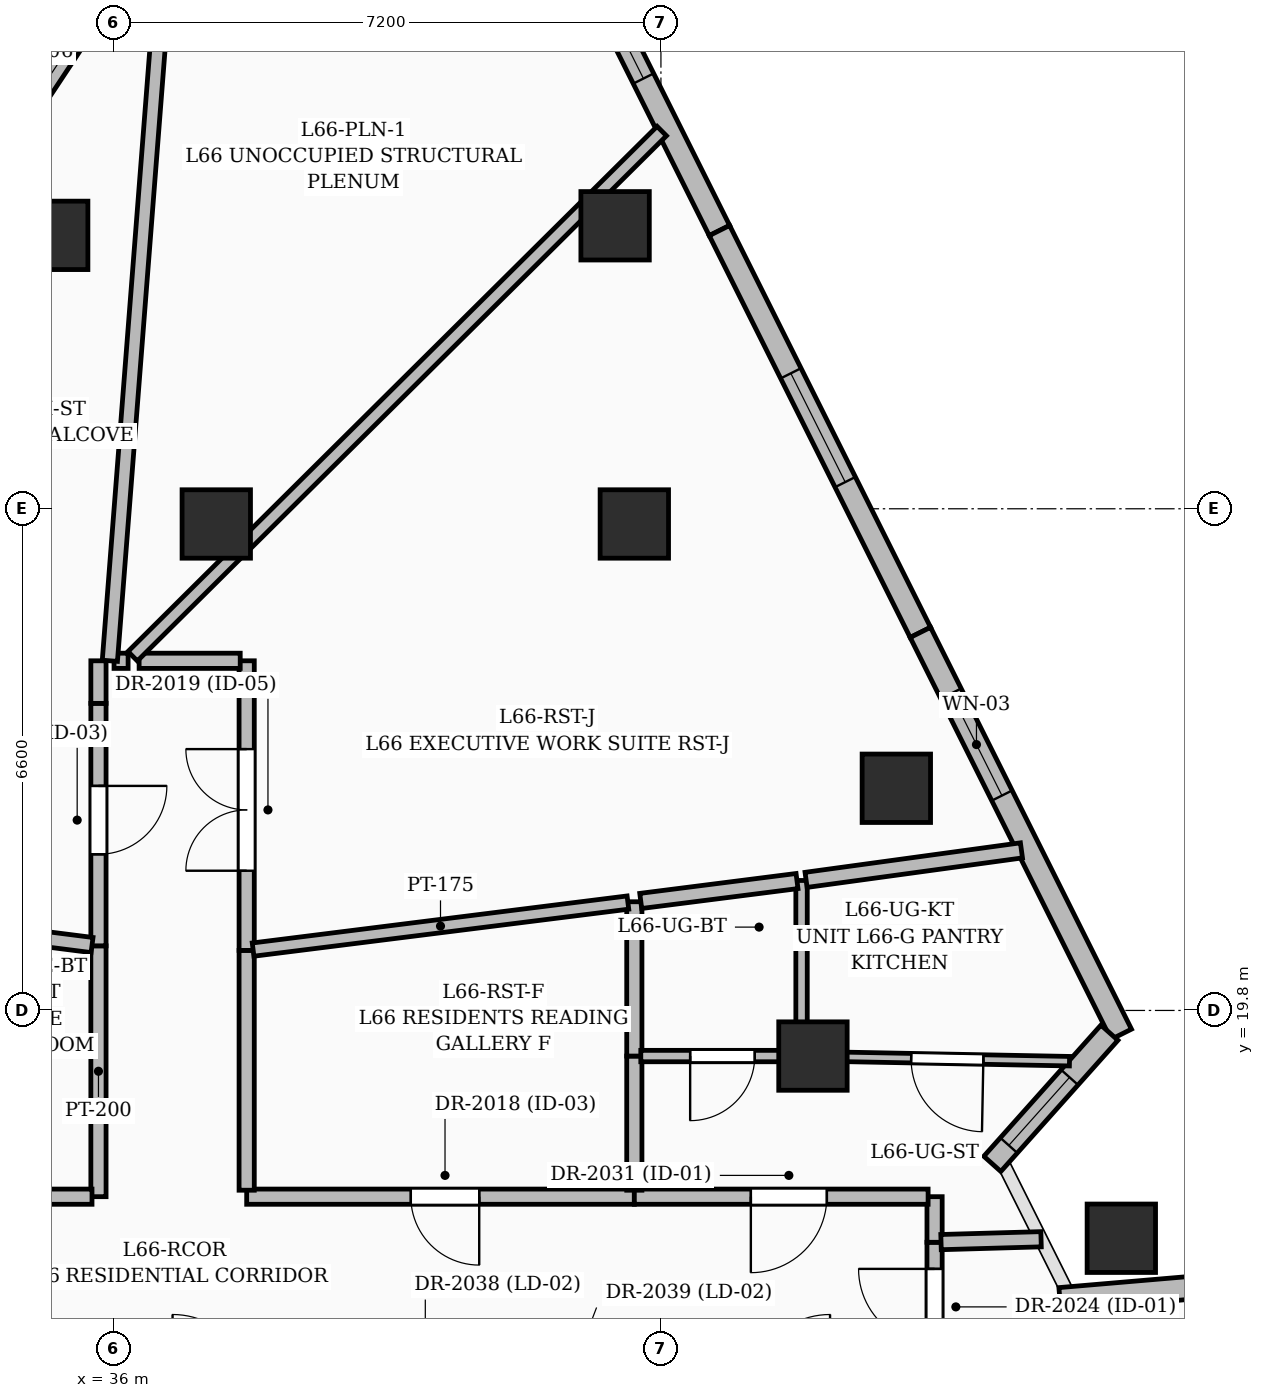
"""IFC4 building model, lengths in metres.
Left out: names, types, materials, properties, quantities, classifications, styles, units other than length and angle.
Written with IfcOpenShell. Run it as: python <this file> out.ifc"""

import sys

from ifc_helpers import new_model, si_unit, direction, frame, frame_2d, origin, origin_2d, place, context, subcontext, project, spatial, rectangle, extrude, element, fill, save


model = new_model("IFC4")
c1 = context("Model", 3, precision=1e-05, world=origin(), true_north=direction((0.0, 1.0)))
c2 = subcontext(c1, "Body", "Model", "MODEL_VIEW")
j1 = project(units=[si_unit("LENGTHUNIT", "METRE"), si_unit("PLANEANGLEUNIT", "RADIAN")], contexts=[c1])
p1 = place(None, origin())
s1 = spatial("IfcSite", under=j1, at=p1, CompositionType="ELEMENT")
p2 = place(p1, origin())
s2 = spatial("IfcBuilding", under=s1, at=p2, CompositionType="ELEMENT")
p3 = place(p2, frame((0.0, 0.0, 255.75)))
s3 = spatial("IfcBuildingStorey", under=s2, at=p3, CompositionType="ELEMENT", Elevation=255.75)
for number, where, z_axis, x_axis in (
    (1, (45.2, 19.2, 0.0), (0.0, 0.0, 1.0), (1.0, 0.0, 0.0)),
    (2, (42.85, 26.2, 0.0), (0.0, 0.0, 1.0), (1.0, 0.0, 0.0)),
    (3, (37.35, 26.2, 0.0), (0.0, 0.0, 1.0), (1.0, 0.0, 0.0)),
    (4, (49.257, 16.803, 0.0), (0.0, 0.0, 1.0), (1.0, 0.0, 0.0)),
    (5, (46.297, 22.723, 0.0), (0.0, 0.0, 1.0), (1.0, 0.0, 0.0)),
    (6, (42.597, 30.123, 0.0), (0.0, 0.0, 1.0), (1.0, 0.0, 0.0)),
    (7, (35.211, 29.997, 0.0), (0.0, 0.0, 1.0), (1.0, 0.0, 0.0)),
):
    element("IfcColumn", number, at=place(p3, frame(where, z_axis=z_axis, x_axis=x_axis)), inside=s3, PredefinedType="COLUMN", context=c2, shape_type="SweptSolid", body=[
        extrude(rectangle(XDim=0.9, YDim=0.9, at=origin_2d()), origin(), (0.0, 0.0, 1.0), 3.75),
    ])
p4 = place(p3, frame((33.699, 29.888, 0.0), z_axis=(0.0, 0.0, 1.0), x_axis=(0.552111744248, 0.833770125312, 0.0)))
e8 = element("IfcWall", 8, at=p4, inside=s3, PredefinedType="SOLIDWALL", context=c2, shape_type="SweptSolid", body=[
    extrude(rectangle(XDim=6.689, YDim=0.3, at=frame_2d((3.344, 0.0))), origin(), (0.0, 0.0, 1.0), 3.5),
])
p5 = place(p4, frame((1.6, 0.0, 0.55)))
e9 = element("IfcOpeningElement", 9, at=p5, cuts=e8, PredefinedType="OPENING", context=c2, shape_type="SweptSolid", body=[
    extrude(rectangle(XDim=1.6, YDim=2.2, at=frame_2d((0.8, 1.1))), frame((0.0, 0.16, 0.0), z_axis=(0.0, -1.0, 0.0), x_axis=(1.0, 0.0, 0.0)), (0.0, 0.0, 1.0), 0.32),
])
p6 = place(p3, frame((41.588, 34.824, 0.0), z_axis=(0.0, 0.0, 1.0), x_axis=(0.4472135955, -0.894427191, 0.0)))
e10 = element("IfcWall", 10, at=p6, inside=s3, PredefinedType="SOLIDWALL", context=c2, shape_type="SweptSolid", body=[
    extrude(rectangle(XDim=5.326, YDim=0.3, at=frame_2d((2.663, 0.0))), origin(), (0.0, 0.0, 1.0), 3.5),
])
p7 = place(p6, frame((1.29, 0.0, 0.6)))
e11 = element("IfcOpeningElement", 11, at=p7, cuts=e10, PredefinedType="OPENING", context=c2, shape_type="SweptSolid", body=[
    extrude(rectangle(XDim=1.8, YDim=2.1, at=frame_2d((0.9, 1.05))), frame((0.0, 0.16, 0.0), z_axis=(0.0, -1.0, 0.0), x_axis=(1.0, 0.0, 0.0)), (0.0, 0.0, 1.0), 0.32),
])
p8 = place(p3, frame((43.97, 30.06, 0.0), z_axis=(0.0, 0.0, 1.0), x_axis=(0.447246638907, -0.894410668534, 0.0)))
e12 = element("IfcWall", 12, at=p8, inside=s3, PredefinedType="SOLIDWALL", context=c2, shape_type="SweptSolid", body=[
    extrude(rectangle(XDim=5.911, YDim=0.3, at=frame_2d((2.955, 0.0))), origin(), (0.0, 0.0, 1.0), 3.5),
])
p9 = place(p8, frame((2.1, 0.0, 0.55)))
e13 = element("IfcOpeningElement", 13, at=p9, cuts=e12, PredefinedType="OPENING", context=c2, shape_type="SweptSolid", body=[
    extrude(rectangle(XDim=1.6, YDim=2.2, at=frame_2d((0.8, 1.1))), frame((0.0, 0.16, 0.0), z_axis=(0.0, -1.0, 0.0), x_axis=(1.0, 0.0, 0.0)), (0.0, 0.0, 1.0), 0.32),
])
p10 = place(p3, frame((46.613, 24.774, 0.0), z_axis=(0.0, 0.0, 1.0), x_axis=(0.447197073873, -0.894435451623, 0.0)))
e14 = element("IfcWall", 14, at=p10, inside=s3, PredefinedType="SOLIDWALL", context=c2, shape_type="SweptSolid", body=[
    extrude(rectangle(XDim=5.911, YDim=0.3, at=frame_2d((2.956, 0.0))), origin(), (0.0, 0.0, 1.0), 3.5),
])
p11 = place(p10, frame((0.9, 0.0, 0.6)))
e15 = element("IfcOpeningElement", 15, at=p11, cuts=e14, PredefinedType="OPENING", context=c2, shape_type="SweptSolid", body=[
    extrude(rectangle(XDim=1.5, YDim=2.1, at=frame_2d((0.75, 1.05))), frame((0.0, 0.16, 0.0), z_axis=(0.0, -1.0, 0.0), x_axis=(1.0, 0.0, 0.0)), (0.0, 0.0, 1.0), 0.32),
])
p12 = place(p3, frame((49.101, 19.508, 0.0), z_axis=(0.0, 0.0, 1.0), x_axis=(-0.665927695229, -0.746016289854, 0.0)))
e16 = element("IfcWall", 16, at=p12, inside=s3, PredefinedType="SOLIDWALL", context=c2, shape_type="SweptSolid", body=[
    extrude(rectangle(XDim=2.314, YDim=0.3, at=frame_2d((1.157, 0.0))), origin(), (0.0, 0.0, 1.0), 2.825),
])
p13 = place(p12, frame((0.788, 0.0, 0.8)))
e17 = element("IfcOpeningElement", 17, at=p13, cuts=e16, PredefinedType="OPENING", context=c2, shape_type="SweptSolid", body=[
    extrude(rectangle(XDim=1.2, YDim=1.8, at=frame_2d((0.6, 0.9))), frame((0.0, 0.16, 0.0), z_axis=(0.0, -1.0, 0.0), x_axis=(1.0, 0.0, 0.0)), (0.0, 0.0, 1.0), 0.32),
])
p14 = place(p3, frame((48.448, 16.004, 0.0), z_axis=(0.0, 0.0, 1.0), x_axis=(0.996372236954, 0.085102088266, 0.0)))
e18 = element("IfcWall", 18, at=p14, inside=s3, PredefinedType="SOLIDWALL", context=c2, shape_type="SweptSolid", body=[
    extrude(rectangle(XDim=2.594, YDim=0.3, at=frame_2d((1.297, 0.0))), origin(), (0.0, 0.0, 1.0), 2.769),
])
p15 = place(p3, frame((46.8, 15.05, 0.0), z_axis=(0.0, 0.0, 1.0), x_axis=(0.0, 1.0, 0.0)))
e19 = element("IfcWall", 19, at=p15, inside=s3, PredefinedType="PARTITIONING", context=c2, shape_type="SweptSolid", body=[
    extrude(rectangle(XDim=1.7, YDim=0.2, at=frame_2d((0.85, 0.0))), origin(), (0.0, 0.0, 1.0), 2.685),
])
p16 = place(p15, frame((0.35, 0.0, 0.0)))
e20 = element("IfcOpeningElement", 20, at=p16, cuts=e19, PredefinedType="OPENING", context=c2, shape_type="SweptSolid", body=[
    extrude(rectangle(XDim=1.0, YDim=2.2, at=frame_2d((0.5, 1.1))), frame((0.0, 0.11, 0.0), z_axis=(0.0, -1.0, 0.0), x_axis=(1.0, 0.0, 0.0)), (0.0, 0.0, 1.0), 0.22),
])
p17 = place(p3, frame((35.8, 20.65, 0.0), z_axis=(0.0, 0.0, 1.0), x_axis=(0.0, -1.0, 0.0)))
e21 = element("IfcWall", 21, at=p17, inside=s3, PredefinedType="PARTITIONING", context=c2, shape_type="SweptSolid", body=[
    extrude(rectangle(XDim=3.3, YDim=0.2, at=frame_2d((1.65, 0.0))), origin(), (0.0, 0.0, 1.0), 3.5),
])
p18 = place(p3, frame((35.715, 17.35, 0.0), z_axis=(0.0, 0.0, 1.0), x_axis=(-1.0, 0.0, 0.0)))
e22 = element("IfcWall", 22, at=p18, inside=s3, PredefinedType="PARTITIONING", context=c2, shape_type="SweptSolid", body=[
    extrude(rectangle(XDim=1.965, YDim=0.2, at=frame_2d((0.982, 0.0))), origin(), (0.0, 0.0, 1.0), 2.685),
])
p19 = place(p3, frame((42.85, 17.35, 0.0), z_axis=(0.0, 0.0, 1.0), x_axis=(-1.0, 0.0, 0.0)))
e23 = element("IfcWall", 23, at=p19, inside=s3, PredefinedType="PARTITIONING", context=c2, shape_type="SweptSolid", body=[
    extrude(rectangle(XDim=5.1, YDim=0.2, at=frame_2d((2.55, 0.0))), origin(), (0.0, 0.0, 1.0), 3.5),
])
p20 = place(p19, frame((2.041, 0.0, 0.0)))
e24 = element("IfcOpeningElement", 24, at=p20, cuts=e23, PredefinedType="OPENING", context=c2, shape_type="SweptSolid", body=[
    extrude(rectangle(XDim=0.9, YDim=2.1, at=frame_2d((0.45, 1.05))), frame((0.0, 0.11, 0.0), z_axis=(0.0, -1.0, 0.0), x_axis=(1.0, 0.0, 0.0)), (0.0, 0.0, 1.0), 0.22),
])
p21 = place(p3, frame((37.75, 17.435, 0.0), z_axis=(0.0, 0.0, 1.0), x_axis=(0.0, 1.0, 0.0)))
e25 = element("IfcWall", 25, at=p21, inside=s3, PredefinedType="PARTITIONING", context=c2, shape_type="SweptSolid", body=[
    extrude(rectangle(XDim=3.155, YDim=0.2, at=frame_2d((1.578, 0.0))), origin(), (0.0, 0.0, 1.0), 3.5),
])
p22 = place(p3, frame((46.8, 16.75, 0.0), z_axis=(0.0, 0.0, 1.0), x_axis=(0.0, 1.0, 0.0)))
e26 = element("IfcWall", 26, at=p22, inside=s3, PredefinedType="PARTITIONING", context=c2, shape_type="SweptSolid", body=[
    extrude(rectangle(XDim=0.6, YDim=0.2, at=frame_2d((0.3, 0.0))), origin(), (0.0, 0.0, 1.0), 3.5),
])
p23 = place(p3, frame((46.715, 17.35, 0.0), z_axis=(0.0, 0.0, 1.0), x_axis=(-1.0, 0.0, 0.0)))
e27 = element("IfcWall", 27, at=p23, inside=s3, PredefinedType="PARTITIONING", context=c2, shape_type="SweptSolid", body=[
    extrude(rectangle(XDim=3.865, YDim=0.2, at=frame_2d((1.933, 0.0))), origin(), (0.0, 0.0, 1.0), 2.685),
])
p24 = place(p23, frame((1.332, 0.0, 0.0)))
e28 = element("IfcOpeningElement", 28, at=p24, cuts=e27, PredefinedType="OPENING", context=c2, shape_type="SweptSolid", body=[
    extrude(rectangle(XDim=1.0, YDim=2.2, at=frame_2d((0.5, 1.1))), frame((0.0, 0.11, 0.0), z_axis=(0.0, -1.0, 0.0), x_axis=(1.0, 0.0, 0.0)), (0.0, 0.0, 1.0), 0.22),
])
p25 = place(p3, frame((35.8, 23.84, 0.0), z_axis=(0.0, 0.0, 1.0), x_axis=(0.0, -1.0, 0.0)))
e29 = element("IfcWall", 29, at=p25, inside=s3, PredefinedType="PARTITIONING", context=c2, shape_type="SweptSolid", body=[
    extrude(rectangle(XDim=3.19, YDim=0.2, at=frame_2d((1.595, 0.0))), origin(), (0.0, 0.0, 1.0), 2.685),
])
p26 = place(p25, frame((1.086, 0.0, 0.0)))
e30 = element("IfcOpeningElement", 30, at=p26, cuts=e29, PredefinedType="OPENING", context=c2, shape_type="SweptSolid", body=[
    extrude(rectangle(XDim=0.9, YDim=2.1, at=frame_2d((0.45, 1.05))), frame((0.0, 0.11, 0.0), z_axis=(0.0, -1.0, 0.0), x_axis=(1.0, 0.0, 0.0)), (0.0, 0.0, 1.0), 0.22),
])
p27 = place(p3, frame((35.8, 24.4, 0.0), z_axis=(0.0, 0.0, 1.0), x_axis=(0.0, -1.0, 0.0)))
e31 = element("IfcWall", 31, at=p27, inside=s3, PredefinedType="PARTITIONING", context=c2, shape_type="SweptSolid", body=[
    extrude(rectangle(XDim=0.56, YDim=0.2, at=frame_2d((0.28, 0.0))), origin(), (0.0, 0.0, 1.0), 2.685),
])
p28 = place(p3, frame((37.75, 20.59, 0.0), z_axis=(0.0, 0.0, 1.0), x_axis=(0.0, 1.0, 0.0)))
e32 = element("IfcWall", 32, at=p28, inside=s3, PredefinedType="PARTITIONING", context=c2, shape_type="SweptSolid", body=[
    extrude(rectangle(XDim=3.81, YDim=0.2, at=frame_2d((1.905, 0.0))), origin(), (0.0, 0.0, 1.0), 3.5),
])
p29 = place(p28, frame((1.048, 0.0, 0.0)))
e33 = element("IfcOpeningElement", 33, at=p29, cuts=e32, PredefinedType="OPENING", context=c2, shape_type="SweptSolid", body=[
    extrude(rectangle(XDim=1.6, YDim=2.3, at=frame_2d((0.8, 1.15))), frame((0.0, 0.11, 0.0), z_axis=(0.0, -1.0, 0.0), x_axis=(1.0, 0.0, 0.0)), (0.0, 0.0, 1.0), 0.22),
])
p30 = place(p3, frame((37.665, 24.4, 0.0), z_axis=(0.0, 0.0, 1.0), x_axis=(-1.0, 0.0, 0.0)))
e34 = element("IfcWall", 34, at=p30, inside=s3, PredefinedType="PARTITIONING", context=c2, shape_type="SweptSolid", body=[
    extrude(rectangle(XDim=1.33, YDim=0.2, at=frame_2d((0.665, 0.0))), origin(), (0.0, 0.0, 1.0), 2.685),
])
p31 = place(p3, frame((36.19, 24.4, 0.0), z_axis=(0.0, 0.0, 1.0), x_axis=(-1.0, 0.0, 0.0)))
e35 = element("IfcWall", 35, at=p31, inside=s3, PredefinedType="PARTITIONING", context=c2, shape_type="SweptSolid", body=[
    extrude(rectangle(XDim=0.185, YDim=0.2, at=frame_2d((0.093, 0.0))), origin(), (0.0, 0.0, 1.0), 2.685),
])
p32 = place(p3, frame((48.201, 16.79, 0.0), z_axis=(0.0, 0.0, 1.0), x_axis=(-0.999592086461, -0.028559773899, 0.0)))
e36 = element("IfcWall", 36, at=p32, inside=s3, PredefinedType="PARTITIONING", context=c2, shape_type="SweptSolid", body=[
    extrude(rectangle(XDim=1.316, YDim=0.2, at=frame_2d((0.658, 0.0))), origin(), (0.0, 0.0, 1.0), 3.5),
])
p33 = place(p3, frame((35.716, 20.661, 0.0), z_axis=(0.0, 0.0, 1.0), x_axis=(-0.992041540235, 0.125911010037, 0.0)))
e37 = element("IfcWall", 37, at=p33, inside=s3, PredefinedType="PARTITIONING", context=c2, shape_type="SweptSolid", body=[
    extrude(rectangle(XDim=1.922, YDim=0.2, at=frame_2d((0.961, 0.0))), origin(), (0.0, 0.0, 1.0), 2.685),
])
p34 = place(p3, frame((42.85, 17.435, 0.0), z_axis=(0.0, 0.0, 1.0), x_axis=(0.0, 1.0, 0.0)))
e38 = element("IfcWall", 38, at=p34, inside=s3, PredefinedType="PARTITIONING", context=c2, shape_type="SweptSolid", body=[
    extrude(rectangle(XDim=1.765, YDim=0.2, at=frame_2d((0.882, 0.0))), origin(), (0.0, 0.0, 1.0), 3.5),
])
p35 = place(p3, frame((42.85, 19.2, 0.0), z_axis=(0.0, 0.0, 1.0), x_axis=(0.0, 1.0, 0.0)))
e39 = element("IfcWall", 39, at=p35, inside=s3, PredefinedType="PARTITIONING", context=c2, shape_type="SweptSolid", body=[
    extrude(rectangle(XDim=2.03, YDim=0.2, at=frame_2d((1.015, 0.0))), origin(), (0.0, 0.0, 1.0), 3.5),
])
p36 = place(p3, frame((42.766, 21.219, 0.0), z_axis=(0.0, 0.0, 1.0), x_axis=(-0.992216542226, -0.124524428662, 0.0)))
e40 = element("IfcWall", 40, at=p36, inside=s3, PredefinedType="PARTITIONING", context=c2, shape_type="SweptSolid", body=[
    extrude(rectangle(XDim=4.97, YDim=0.175, at=frame_2d((2.485, 0.0))), origin(), (0.0, 0.0, 1.0), 3.5),
])
p37 = place(p3, frame((48.575, 19.133, 0.0), z_axis=(0.0, 0.0, 1.0), x_axis=(-0.999817335108, 0.019112729221, 0.0)))
e41 = element("IfcWall", 41, at=p37, inside=s3, PredefinedType="PARTITIONING", context=c2, shape_type="SweptSolid", body=[
    extrude(rectangle(XDim=3.526, YDim=0.125, at=frame_2d((1.763, 0.0))), origin(), (0.0, 0.0, 1.0), 2.82),
])
p38 = place(p37, frame((1.133, 0.0, 0.0)))
e42 = element("IfcOpeningElement", 42, at=p38, cuts=e41, PredefinedType="OPENING", context=c2, shape_type="SweptSolid", body=[
    extrude(rectangle(XDim=0.95, YDim=2.2, at=frame_2d((0.475, 1.1))), frame((0.0, 0.072, 0.0), z_axis=(0.0, -1.0, 0.0), x_axis=(1.0, 0.0, 0.0)), (0.0, 0.0, 1.0), 0.145),
])
p39 = place(p3, frame((45.05, 19.2, 0.0), z_axis=(0.0, 0.0, 1.0), x_axis=(-1.0, 0.0, 0.0)))
e43 = element("IfcWall", 43, at=p39, inside=s3, PredefinedType="PARTITIONING", context=c2, shape_type="SweptSolid", body=[
    extrude(rectangle(XDim=2.115, YDim=0.15, at=frame_2d((1.058, 0.0))), origin(), (0.0, 0.0, 1.0), 3.5),
])
p40 = place(p39, frame((0.615, 0.0, 0.0)))
e44 = element("IfcOpeningElement", 44, at=p40, cuts=e43, PredefinedType="OPENING", context=c2, shape_type="SweptSolid", body=[
    extrude(rectangle(XDim=0.85, YDim=2.1, at=frame_2d((0.425, 1.05))), frame((0.0, 0.085, 0.0), z_axis=(0.0, -1.0, 0.0), x_axis=(1.0, 0.0, 0.0)), (0.0, 0.0, 1.0), 0.17),
])
p41 = place(p3, frame((45.05, 21.51, 0.0), z_axis=(0.0, 0.0, 1.0), x_axis=(0.0, -1.0, 0.0)))
e45 = element("IfcWall", 45, at=p41, inside=s3, PredefinedType="PARTITIONING", context=c2, shape_type="SweptSolid", body=[
    extrude(rectangle(XDim=2.262, YDim=0.15, at=frame_2d((1.131, 0.0))), origin(), (0.0, 0.0, 1.0), 2.685),
])
p42 = place(p3, frame((47.943, 21.906, 0.0), z_axis=(0.0, 0.0, 1.0), x_axis=(-0.990745822973, -0.135730299718, 0.0)))
e46 = element("IfcWall", 46, at=p42, inside=s3, PredefinedType="PARTITIONING", context=c2, shape_type="SweptSolid", body=[
    extrude(rectangle(XDim=2.86, YDim=0.2, at=frame_2d((1.43, 0.0))), origin(), (0.0, 0.0, 1.0), 2.764),
])
p43 = place(p3, frame((44.99, 21.502, 0.0), z_axis=(0.0, 0.0, 1.0), x_axis=(-0.991996302331, -0.126266924258, 0.0)))
e47 = element("IfcWall", 47, at=p43, inside=s3, PredefinedType="PARTITIONING", context=c2, shape_type="SweptSolid", body=[
    extrude(rectangle(XDim=2.073, YDim=0.2, at=frame_2d((1.036, 0.0))), origin(), (0.0, 0.0, 1.0), 2.685),
])
p44 = place(p3, frame((35.95, 24.4, 0.0), z_axis=(0.0, 0.0, 1.0), x_axis=(0.077621970398, 0.996982863299, 0.0)))
e48 = element("IfcWall", 48, at=p44, inside=s3, PredefinedType="PARTITIONING", context=c2, shape_type="SweptSolid", body=[
    extrude(rectangle(XDim=9.804, YDim=0.2, at=frame_2d((4.902, 0.0))), origin(), (0.0, 0.0, 1.0), 2.764),
])
p45 = place(p3, frame((43.211, 31.369, 0.0), z_axis=(0.0, 0.0, 1.0), x_axis=(-0.709740576129, -0.704463139275, 0.0)))
e49 = element("IfcWall", 49, at=p45, inside=s3, PredefinedType="PARTITIONING", context=c2, shape_type="SweptSolid", body=[
    extrude(rectangle(XDim=9.807, YDim=0.175, at=frame_2d((4.904, 0.0))), origin(), (0.0, 0.0, 1.0), 2.685),
])
p46 = place(p5, origin())
e50 = element("IfcWindow", 50, at=p46, inside=s3, PartitioningType="SINGLE_PANEL", PredefinedType="WINDOW", context=c2, shape_type="SweptSolid", body=[
    extrude(rectangle(XDim=1.6, YDim=2.2, at=frame_2d((0.8, 1.1))), frame((0.0, 0.03, 0.0), z_axis=(0.0, -1.0, 0.0), x_axis=(1.0, 0.0, 0.0)), (0.0, 0.0, 1.0), 0.06),
])
fill(e9, e50)
p47 = place(p7, origin())
e51 = element("IfcWindow", 51, at=p47, inside=s3, PartitioningType="SINGLE_PANEL", PredefinedType="WINDOW", context=c2, shape_type="SweptSolid", body=[
    extrude(rectangle(XDim=1.8, YDim=2.1, at=frame_2d((0.9, 1.05))), frame((0.0, 0.03, 0.0), z_axis=(0.0, -1.0, 0.0), x_axis=(1.0, 0.0, 0.0)), (0.0, 0.0, 1.0), 0.06),
])
fill(e11, e51)
p48 = place(p9, origin())
e52 = element("IfcWindow", 52, at=p48, inside=s3, PartitioningType="SINGLE_PANEL", PredefinedType="WINDOW", context=c2, shape_type="SweptSolid", body=[
    extrude(rectangle(XDim=1.6, YDim=2.2, at=frame_2d((0.8, 1.1))), frame((0.0, 0.03, 0.0), z_axis=(0.0, -1.0, 0.0), x_axis=(1.0, 0.0, 0.0)), (0.0, 0.0, 1.0), 0.06),
])
fill(e13, e52)
p49 = place(p11, origin())
e53 = element("IfcWindow", 53, at=p49, inside=s3, PartitioningType="SINGLE_PANEL", PredefinedType="WINDOW", context=c2, shape_type="SweptSolid", body=[
    extrude(rectangle(XDim=1.5, YDim=2.1, at=frame_2d((0.75, 1.05))), frame((0.0, 0.03, 0.0), z_axis=(0.0, -1.0, 0.0), x_axis=(1.0, 0.0, 0.0)), (0.0, 0.0, 1.0), 0.06),
])
fill(e15, e53)
p50 = place(p20, origin())
e54 = element("IfcDoor", 54, at=p50, inside=s3, OperationType="SINGLE_SWING_LEFT", PredefinedType="DOOR", context=c2, shape_type="SweptSolid", body=[
    extrude(rectangle(XDim=0.9, YDim=2.1, at=frame_2d((0.45, 1.05))), frame((0.0, 0.025, 0.0), z_axis=(0.0, -1.0, 0.0), x_axis=(1.0, 0.0, 0.0)), (0.0, 0.0, 1.0), 0.05),
])
fill(e24, e54)
p51 = place(p29, origin())
e55 = element("IfcDoor", 55, at=p51, inside=s3, OperationType="DOUBLE_DOOR_SINGLE_SWING", PredefinedType="DOOR", context=c2, shape_type="SweptSolid", body=[
    extrude(rectangle(XDim=1.6, YDim=2.3, at=frame_2d((0.8, 1.15))), frame((0.0, 0.025, 0.0), z_axis=(0.0, -1.0, 0.0), x_axis=(1.0, 0.0, 0.0)), (0.0, 0.0, 1.0), 0.05),
])
fill(e33, e55)
p52 = place(p26, origin())
e56 = element("IfcDoor", 56, at=p52, inside=s3, OperationType="SINGLE_SWING_LEFT", PredefinedType="DOOR", context=c2, shape_type="SweptSolid", body=[
    extrude(rectangle(XDim=0.9, YDim=2.1, at=frame_2d((0.45, 1.05))), frame((0.0, 0.025, 0.0), z_axis=(0.0, -1.0, 0.0), x_axis=(1.0, 0.0, 0.0)), (0.0, 0.0, 1.0), 0.05),
])
fill(e30, e56)
p53 = place(p16, origin())
e57 = element("IfcDoor", 57, at=p53, inside=s3, OperationType="SINGLE_SWING_RIGHT", PredefinedType="DOOR", context=c2, shape_type="SweptSolid", body=[
    extrude(rectangle(XDim=1.0, YDim=2.2, at=frame_2d((0.5, 1.1))), frame((0.0, 0.025, 0.0), z_axis=(0.0, -1.0, 0.0), x_axis=(1.0, 0.0, 0.0)), (0.0, 0.0, 1.0), 0.05),
])
fill(e20, e57)
p54 = place(p24, origin())
e58 = element("IfcDoor", 58, at=p54, inside=s3, OperationType="SINGLE_SWING_RIGHT", PredefinedType="DOOR", context=c2, shape_type="SweptSolid", body=[
    extrude(rectangle(XDim=1.0, YDim=2.2, at=frame_2d((0.5, 1.1))), frame((0.0, 0.025, 0.0), z_axis=(0.0, -1.0, 0.0), x_axis=(1.0, 0.0, 0.0)), (0.0, 0.0, 1.0), 0.05),
])
fill(e28, e58)
p55 = place(p38, origin())
e59 = element("IfcDoor", 59, at=p55, inside=s3, OperationType="SINGLE_SWING_LEFT", PredefinedType="DOOR", context=c2, shape_type="SweptSolid", body=[
    extrude(rectangle(XDim=0.95, YDim=2.2, at=frame_2d((0.475, 1.1))), frame((0.0, 0.025, 0.0), z_axis=(0.0, -1.0, 0.0), x_axis=(1.0, 0.0, 0.0)), (0.0, 0.0, 1.0), 0.05),
])
fill(e42, e59)
p56 = place(p40, origin())
e60 = element("IfcDoor", 60, at=p56, inside=s3, OperationType="SINGLE_SWING_RIGHT", PredefinedType="DOOR", context=c2, shape_type="SweptSolid", body=[
    extrude(rectangle(XDim=0.85, YDim=2.1, at=frame_2d((0.425, 1.05))), frame((0.0, 0.025, 0.0), z_axis=(0.0, -1.0, 0.0), x_axis=(1.0, 0.0, 0.0)), (0.0, 0.0, 1.0), 0.05),
])
fill(e44, e60)
p57 = place(p13, origin())
e61 = element("IfcWindow", 61, at=p57, inside=s3, PartitioningType="SINGLE_PANEL", PredefinedType="WINDOW", context=c2, shape_type="SweptSolid", body=[
    extrude(rectangle(XDim=1.2, YDim=1.8, at=frame_2d((0.6, 0.9))), frame((0.0, 0.03, 0.0), z_axis=(0.0, -1.0, 0.0), x_axis=(1.0, 0.0, 0.0)), (0.0, 0.0, 1.0), 0.06),
])
fill(e17, e61)
save(model, sys.argv[1])
